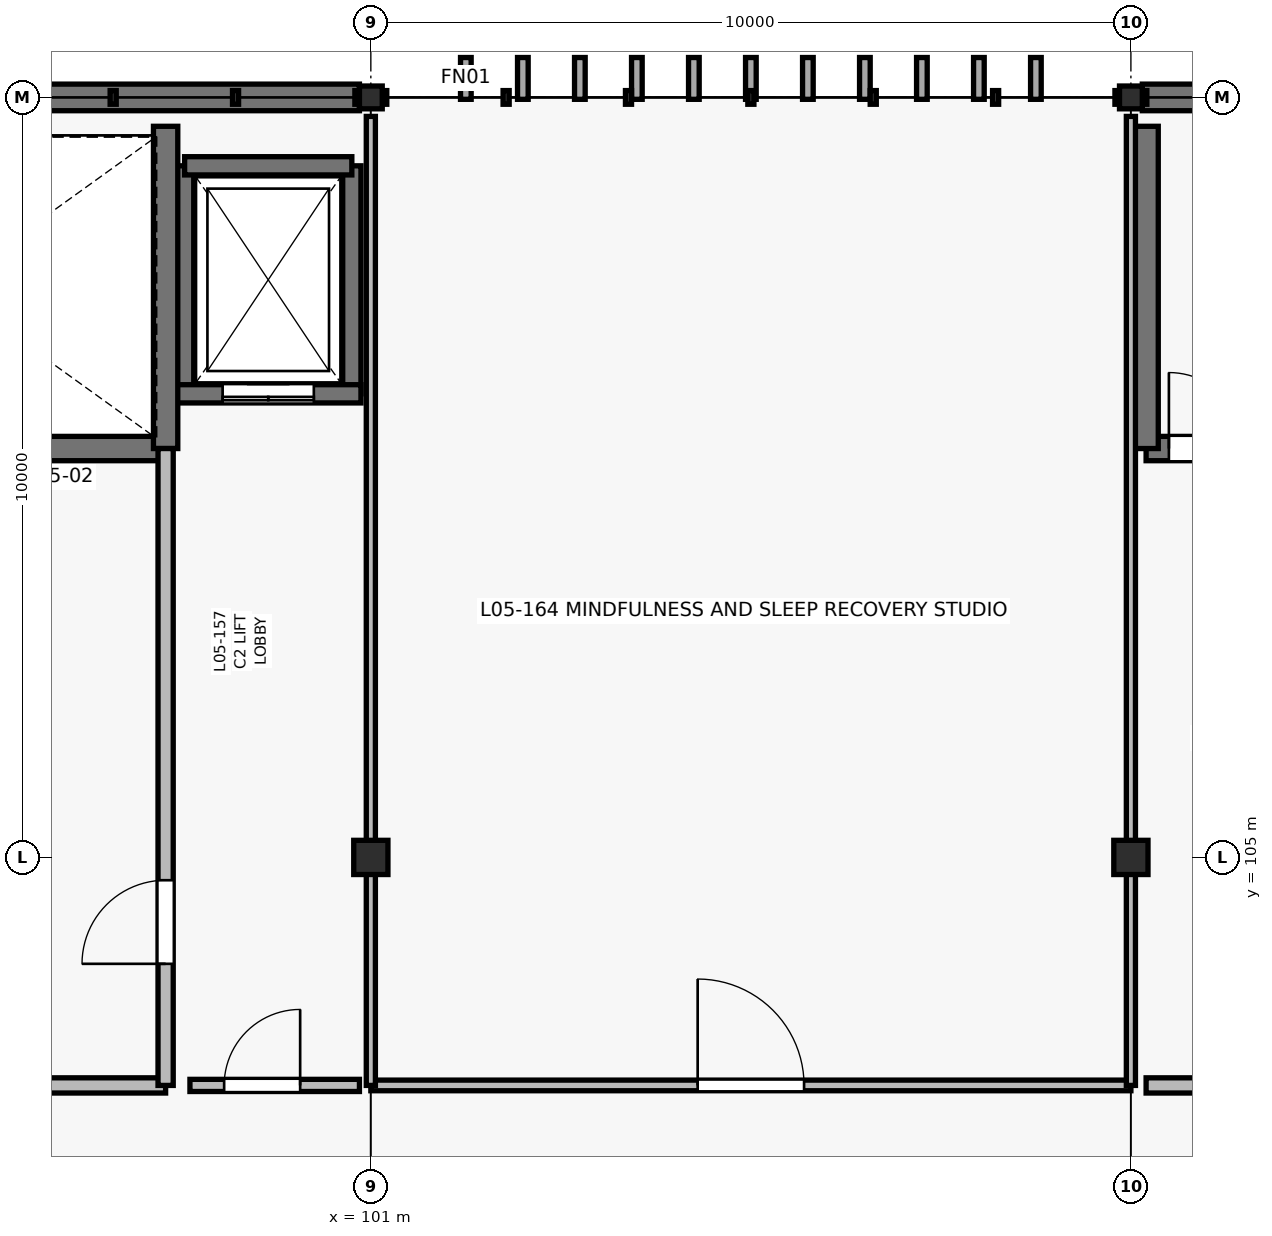
"""IFC4 building model, lengths in metres.
Left out: names, types, materials, properties, quantities, classifications, styles, units other than length and angle.
Written with IfcOpenShell. Run it as: python <this file> out.ifc"""

import sys

from ifc_helpers import new_model, si_unit, direction, frame, frame_2d, origin, origin_2d, place, context, subcontext, project, spatial, rectangle, i_section, extrude, element, fill, save


model = new_model("IFC4")
c1 = context("Model", 3, precision=1e-05, world=origin(), true_north=direction((0.0, 1.0)))
c2 = subcontext(c1, "Body", "Model", "MODEL_VIEW")
j1 = project(units=[si_unit("LENGTHUNIT", "METRE"), si_unit("PLANEANGLEUNIT", "RADIAN")], contexts=[c1])
p1 = place(None, origin())
s1 = spatial("IfcSite", under=j1, at=p1, CompositionType="ELEMENT")
p2 = place(p1, origin())
s2 = spatial("IfcBuilding", under=s1, at=p2, CompositionType="ELEMENT")
p3 = place(p2, frame((0.0, 0.0, 21.6)))
s3 = spatial("IfcBuildingStorey", under=s2, at=p3, CompositionType="ELEMENT", Elevation=21.6)
p4 = place(p3, frame((101.0, 105.0, 0.0), z_axis=(0.0, 0.0, 1.0), x_axis=(1.0, 0.0, 0.0)))
e1 = element("IfcColumn", 1, at=p4, inside=s3, PredefinedType="COLUMN", context=c2, shape_type="SweptSolid", body=[
    extrude(rectangle(XDim=0.45, YDim=0.45, at=origin_2d()), origin(), (0.0, 0.0, 1.0), 4.2),
])
p5 = place(p3, frame((101.0, 115.0, 0.0), z_axis=(0.0, 0.0, 1.0), x_axis=(1.0, 0.0, 0.0)))
e2 = element("IfcColumn", 2, at=p5, inside=s3, PredefinedType="COLUMN", context=c2, shape_type="SweptSolid", body=[
    extrude(i_section(OverallWidth=0.3, OverallDepth=0.3, WebThickness=0.011, FlangeThickness=0.019, at=origin_2d()), origin(), (0.0, 0.0, 1.0), 4.2),
])
p6 = place(p3, frame((111.0, 105.0, 0.0), z_axis=(0.0, 0.0, 1.0), x_axis=(1.0, 0.0, 0.0)))
e3 = element("IfcColumn", 3, at=p6, inside=s3, PredefinedType="COLUMN", context=c2, shape_type="SweptSolid", body=[
    extrude(rectangle(XDim=0.45, YDim=0.45, at=origin_2d()), origin(), (0.0, 0.0, 1.0), 4.2),
])
p7 = place(p3, frame((111.0, 115.0, 0.0), z_axis=(0.0, 0.0, 1.0), x_axis=(1.0, 0.0, 0.0)))
e4 = element("IfcColumn", 4, at=p7, inside=s3, PredefinedType="COLUMN", context=c2, shape_type="SweptSolid", body=[
    extrude(i_section(OverallWidth=0.3, OverallDepth=0.3, WebThickness=0.011, FlangeThickness=0.019, at=origin_2d()), origin(), (0.0, 0.0, 1.0), 4.2),
])
p8 = place(p3, frame((91.15, 115.0, 0.0), z_axis=(0.0, 0.0, 1.0), x_axis=(1.0, 0.0, 0.0)))
e5 = element("IfcWall", 5, at=p8, inside=s3, PredefinedType="SOLIDWALL", context=c2, shape_type="SweptSolid", body=[
    extrude(rectangle(XDim=9.7, YDim=0.35, at=frame_2d((4.85, 0.0))), origin(), (0.0, 0.0, 1.0), 4.2),
])
p9 = place(p8, frame((2.2, 0.0, 1.0)))
e6 = element("IfcOpeningElement", 6, at=p9, cuts=e5, PredefinedType="OPENING", context=c2, shape_type="SweptSolid", body=[
    extrude(rectangle(XDim=2.1, YDim=1.5, at=frame_2d((1.05, 0.75))), frame((0.0, 0.185, 0.0), z_axis=(0.0, -1.0, 0.0), x_axis=(1.0, 0.0, 0.0)), (0.0, 0.0, 1.0), 0.37),
])
p10 = place(p3, frame((111.15, 115.0, 0.0), z_axis=(0.0, 0.0, 1.0), x_axis=(1.0, 0.0, 0.0)))
e7 = element("IfcWall", 7, at=p10, inside=s3, PredefinedType="SOLIDWALL", context=c2, shape_type="SweptSolid", body=[
    extrude(rectangle(XDim=9.7, YDim=0.35, at=frame_2d((4.85, 0.0))), origin(), (0.0, 0.0, 1.0), 4.2),
])
p11 = place(p10, frame((2.2, 0.0, 1.0)))
e8 = element("IfcOpeningElement", 8, at=p11, cuts=e7, PredefinedType="OPENING", context=c2, shape_type="SweptSolid", body=[
    extrude(rectangle(XDim=2.7, YDim=1.5, at=frame_2d((1.35, 0.75))), frame((0.0, 0.185, 0.0), z_axis=(0.0, -1.0, 0.0), x_axis=(1.0, 0.0, 0.0)), (0.0, 0.0, 1.0), 0.37),
])
for number, where, z_axis, x_axis in (
    (9, (98.55, 111.1, 0.0), (0.0, 0.0, 1.0), (0.0, 1.0, 0.0)),
    (10, (100.75, 114.1, 0.0), (0.0, 0.0, 1.0), (0.0, -1.0, 0.0)),
):
    element("IfcWall", number, at=place(p3, frame(where, z_axis=z_axis, x_axis=x_axis)), inside=s3, PredefinedType="SHEAR", context=c2, shape_type="SweptSolid", body=[
        extrude(rectangle(XDim=3.0, YDim=0.24, at=frame_2d((1.5, 0.0))), origin(), (0.0, 0.0, 1.0), 3.95),
    ])
p12 = place(p3, frame((98.55, 114.1, 0.0), z_axis=(0.0, 0.0, 1.0), x_axis=(1.0, 0.0, 0.0)))
e11 = element("IfcWall", 11, at=p12, inside=s3, PredefinedType="SHEAR", context=c2, shape_type="SweptSolid", body=[
    extrude(rectangle(XDim=2.2, YDim=0.24, at=frame_2d((1.1, 0.0))), origin(), (0.0, 0.0, 1.0), 3.95),
])
p13 = place(p3, frame((100.87, 111.1, 0.0), z_axis=(0.0, 0.0, 1.0), x_axis=(-1.0, 0.0, 0.0)))
e12 = element("IfcWall", 12, at=p13, inside=s3, PredefinedType="SHEAR", context=c2, shape_type="SweptSolid", body=[
    extrude(rectangle(XDim=2.44, YDim=0.24, at=frame_2d((1.22, 0.0))), origin(), (0.0, 0.0, 1.0), 3.95),
])
p14 = place(p13, frame((0.62, 0.0, 0.0)))
e13 = element("IfcOpeningElement", 13, at=p14, cuts=e12, PredefinedType="OPENING", context=c2, shape_type="SweptSolid", body=[
    extrude(rectangle(XDim=1.2, YDim=2.15, at=frame_2d((0.6, 1.075))), frame((0.0, 0.13, 0.0), z_axis=(0.0, -1.0, 0.0), x_axis=(1.0, 0.0, 0.0)), (0.0, 0.0, 1.0), 0.26),
])
p15 = place(p3, frame((91.2, 110.38, 0.0), z_axis=(0.0, 0.0, 1.0), x_axis=(1.0, 0.0, 0.0)))
e14 = element("IfcWall", 14, at=p15, inside=s3, PredefinedType="SHEAR", context=c2, shape_type="SweptSolid", body=[
    extrude(rectangle(XDim=7.1, YDim=0.32, at=frame_2d((3.55, 0.0))), origin(), (0.0, 0.0, 1.0), 3.95),
])
p16 = place(p15, frame((0.3, 0.0, 0.0)))
e15 = element("IfcOpeningElement", 15, at=p16, cuts=e14, PredefinedType="OPENING", context=c2, shape_type="SweptSolid", body=[
    extrude(rectangle(XDim=1.0, YDim=2.15, at=frame_2d((0.5, 1.075))), frame((0.0, 0.17, 0.0), z_axis=(0.0, -1.0, 0.0), x_axis=(1.0, 0.0, 0.0)), (0.0, 0.0, 1.0), 0.34),
])
p17 = place(p3, frame((98.3, 110.38, 0.0), z_axis=(0.0, 0.0, 1.0), x_axis=(0.0, 1.0, 0.0)))
e16 = element("IfcWall", 16, at=p17, inside=s3, PredefinedType="SHEAR", context=c2, shape_type="SweptSolid", body=[
    extrude(rectangle(XDim=4.24, YDim=0.32, at=frame_2d((2.12, 0.0))), origin(), (0.0, 0.0, 1.0), 3.95),
])
p18 = place(p3, frame((91.2, 102.0, 0.0), z_axis=(0.0, 0.0, 1.0), x_axis=(1.0, 0.0, 0.0)))
e17 = element("IfcWall", 17, at=p18, inside=s3, PredefinedType="PARTITIONING", context=c2, shape_type="SweptSolid", body=[
    extrude(rectangle(XDim=7.1, YDim=0.2, at=frame_2d((3.55, 0.0))), origin(), (0.0, 0.0, 1.0), 3.25),
])
p19 = place(p18, frame((2.2, 0.0, 0.0)))
e18 = element("IfcOpeningElement", 18, at=p19, cuts=e17, PredefinedType="OPENING", context=c2, shape_type="SweptSolid", body=[
    extrude(rectangle(XDim=1.6, YDim=2.2, at=frame_2d((0.8, 1.1))), frame((0.0, 0.11, 0.0), z_axis=(0.0, -1.0, 0.0), x_axis=(1.0, 0.0, 0.0)), (0.0, 0.0, 1.0), 0.22),
])
p20 = place(p3, frame((98.3, 102.0, 0.0), z_axis=(0.0, 0.0, 1.0), x_axis=(0.0, 1.0, 0.0)))
e19 = element("IfcWall", 19, at=p20, inside=s3, PredefinedType="PARTITIONING", context=c2, shape_type="SweptSolid", body=[
    extrude(rectangle(XDim=8.38, YDim=0.2, at=frame_2d((4.19, 0.0))), origin(), (0.0, 0.0, 1.0), 3.3),
])
p21 = place(p20, frame((1.6, 0.0, 0.0)))
e20 = element("IfcOpeningElement", 20, at=p21, cuts=e19, PredefinedType="OPENING", context=c2, shape_type="SweptSolid", body=[
    extrude(rectangle(XDim=1.1, YDim=2.15, at=frame_2d((0.55, 1.075))), frame((0.0, 0.11, 0.0), z_axis=(0.0, -1.0, 0.0), x_axis=(1.0, 0.0, 0.0)), (0.0, 0.0, 1.0), 0.22),
])
p22 = place(p3, frame((98.62, 102.0, 0.0), z_axis=(0.0, 0.0, 1.0), x_axis=(1.0, 0.0, 0.0)))
e21 = element("IfcWall", 21, at=p22, inside=s3, PredefinedType="PARTITIONING", context=c2, shape_type="SweptSolid", body=[
    extrude(rectangle(XDim=2.23, YDim=0.16, at=frame_2d((1.115, 0.0))), origin(), (0.0, 0.0, 1.0), 3.25),
])
p23 = place(p22, frame((0.45, 0.0, 0.0)))
e22 = element("IfcOpeningElement", 22, at=p23, cuts=e21, PredefinedType="OPENING", context=c2, shape_type="SweptSolid", body=[
    extrude(rectangle(XDim=1.0, YDim=2.15, at=frame_2d((0.5, 1.075))), frame((0.0, 0.09, 0.0), z_axis=(0.0, -1.0, 0.0), x_axis=(1.0, 0.0, 0.0)), (0.0, 0.0, 1.0), 0.18),
])
p24 = place(p3, frame((111.2, 110.38, 0.0), z_axis=(0.0, 0.0, 1.0), x_axis=(1.0, 0.0, 0.0)))
e23 = element("IfcWall", 23, at=p24, inside=s3, PredefinedType="SHEAR", context=c2, shape_type="SweptSolid", body=[
    extrude(rectangle(XDim=7.1, YDim=0.32, at=frame_2d((3.55, 0.0))), origin(), (0.0, 0.0, 1.0), 3.95),
])
p25 = place(p24, frame((0.3, 0.0, 0.0)))
e24 = element("IfcOpeningElement", 24, at=p25, cuts=e23, PredefinedType="OPENING", context=c2, shape_type="SweptSolid", body=[
    extrude(rectangle(XDim=1.0, YDim=2.15, at=frame_2d((0.5, 1.075))), frame((0.0, 0.17, 0.0), z_axis=(0.0, -1.0, 0.0), x_axis=(1.0, 0.0, 0.0)), (0.0, 0.0, 1.0), 0.34),
])
p26 = place(p3, frame((111.2, 114.62, 0.0), z_axis=(0.0, 0.0, 1.0), x_axis=(0.0, -1.0, 0.0)))
e25 = element("IfcWall", 25, at=p26, inside=s3, PredefinedType="SHEAR", context=c2, shape_type="SweptSolid", body=[
    extrude(rectangle(XDim=4.24, YDim=0.32, at=frame_2d((2.12, 0.0))), origin(), (0.0, 0.0, 1.0), 3.95),
])
p27 = place(p3, frame((111.2, 102.0, 0.0), z_axis=(0.0, 0.0, 1.0), x_axis=(1.0, 0.0, 0.0)))
e26 = element("IfcWall", 26, at=p27, inside=s3, PredefinedType="PARTITIONING", context=c2, shape_type="SweptSolid", body=[
    extrude(rectangle(XDim=7.1, YDim=0.2, at=frame_2d((3.55, 0.0))), origin(), (0.0, 0.0, 1.0), 3.25),
])
p28 = place(p27, frame((2.2, 0.0, 0.0)))
e27 = element("IfcOpeningElement", 27, at=p28, cuts=e26, PredefinedType="OPENING", context=c2, shape_type="SweptSolid", body=[
    extrude(rectangle(XDim=1.6, YDim=2.2, at=frame_2d((0.8, 1.1))), frame((0.0, 0.11, 0.0), z_axis=(0.0, -1.0, 0.0), x_axis=(1.0, 0.0, 0.0)), (0.0, 0.0, 1.0), 0.22),
])
p29 = place(p3, frame((101.0, 102.0, 0.0), z_axis=(0.0, 0.0, 1.0), x_axis=(1.0, 0.0, 0.0)))
e28 = element("IfcWall", 28, at=p29, inside=s3, PredefinedType="PARTITIONING", context=c2, shape_type="SweptSolid", body=[
    extrude(rectangle(XDim=10.0, YDim=0.14, at=frame_2d((5.0, 0.0))), origin(), (0.0, 0.0, 1.0), 3.25),
])
p30 = place(p29, frame((4.3, 0.0, 0.0)))
e29 = element("IfcOpeningElement", 29, at=p30, cuts=e28, PredefinedType="OPENING", context=c2, shape_type="SweptSolid", body=[
    extrude(rectangle(XDim=1.4, YDim=2.2, at=frame_2d((0.7, 1.1))), frame((0.0, 0.08, 0.0), z_axis=(0.0, -1.0, 0.0), x_axis=(1.0, 0.0, 0.0)), (0.0, 0.0, 1.0), 0.16),
])
for number, where, z_axis, x_axis in (
    (30, (101.0, 102.0, 0.0), (0.0, 0.0, 1.0), (0.0, 1.0, 0.0)),
    (31, (111.0, 102.0, 0.0), (0.0, 0.0, 1.0), (0.0, 1.0, 0.0)),
):
    element("IfcWall", number, at=place(p3, frame(where, z_axis=z_axis, x_axis=x_axis)), inside=s3, PredefinedType="PARTITIONING", context=c2, shape_type="SweptSolid", body=[
        extrude(rectangle(XDim=12.75, YDim=0.12, at=frame_2d((6.375, 0.0))), origin(), (0.0, 0.0, 1.0), 3.25),
    ])
p31 = place(p14, origin())
e32 = element("IfcDoor", 32, at=p31, inside=s3, OperationType="DOUBLE_DOOR_SLIDING", PredefinedType="USERDEFINED", context=c2, shape_type="SweptSolid", body=[
    extrude(rectangle(XDim=1.2, YDim=2.15, at=frame_2d((0.6, 1.075))), frame((0.0, 0.025, 0.0), z_axis=(0.0, -1.0, 0.0), x_axis=(1.0, 0.0, 0.0)), (0.0, 0.0, 1.0), 0.05),
])
fill(e13, e32)
p32 = place(p21, origin())
e33 = element("IfcDoor", 33, at=p32, inside=s3, OperationType="SINGLE_SWING_LEFT", PredefinedType="DOOR", context=c2, shape_type="SweptSolid", body=[
    extrude(rectangle(XDim=1.1, YDim=2.15, at=frame_2d((0.55, 1.075))), frame((0.0, 0.025, 0.0), z_axis=(0.0, -1.0, 0.0), x_axis=(1.0, 0.0, 0.0)), (0.0, 0.0, 1.0), 0.05),
])
fill(e20, e33)
p33 = place(p23, origin())
e34 = element("IfcDoor", 34, at=p33, inside=s3, OperationType="SINGLE_SWING_RIGHT", PredefinedType="DOOR", context=c2, shape_type="SweptSolid", body=[
    extrude(rectangle(XDim=1.0, YDim=2.15, at=frame_2d((0.5, 1.075))), frame((0.0, 0.025, 0.0), z_axis=(0.0, -1.0, 0.0), x_axis=(1.0, 0.0, 0.0)), (0.0, 0.0, 1.0), 0.05),
])
fill(e22, e34)
p34 = place(p25, origin())
e35 = element("IfcDoor", 35, at=p34, inside=s3, OperationType="SINGLE_SWING_LEFT", PredefinedType="DOOR", context=c2, shape_type="SweptSolid", body=[
    extrude(rectangle(XDim=1.0, YDim=2.15, at=frame_2d((0.5, 1.075))), frame((0.0, 0.025, 0.0), z_axis=(0.0, -1.0, 0.0), x_axis=(1.0, 0.0, 0.0)), (0.0, 0.0, 1.0), 0.05),
])
fill(e24, e35)
p35 = place(p30, origin())
e36 = element("IfcDoor", 36, at=p35, inside=s3, OperationType="SINGLE_SWING_LEFT", PredefinedType="DOOR", context=c2, shape_type="SweptSolid", body=[
    extrude(rectangle(XDim=1.4, YDim=2.2, at=frame_2d((0.7, 1.1))), frame((0.0, 0.025, 0.0), z_axis=(0.0, -1.0, 0.0), x_axis=(1.0, 0.0, 0.0)), (0.0, 0.0, 1.0), 0.05),
])
fill(e29, e36)
save(model, sys.argv[1])
